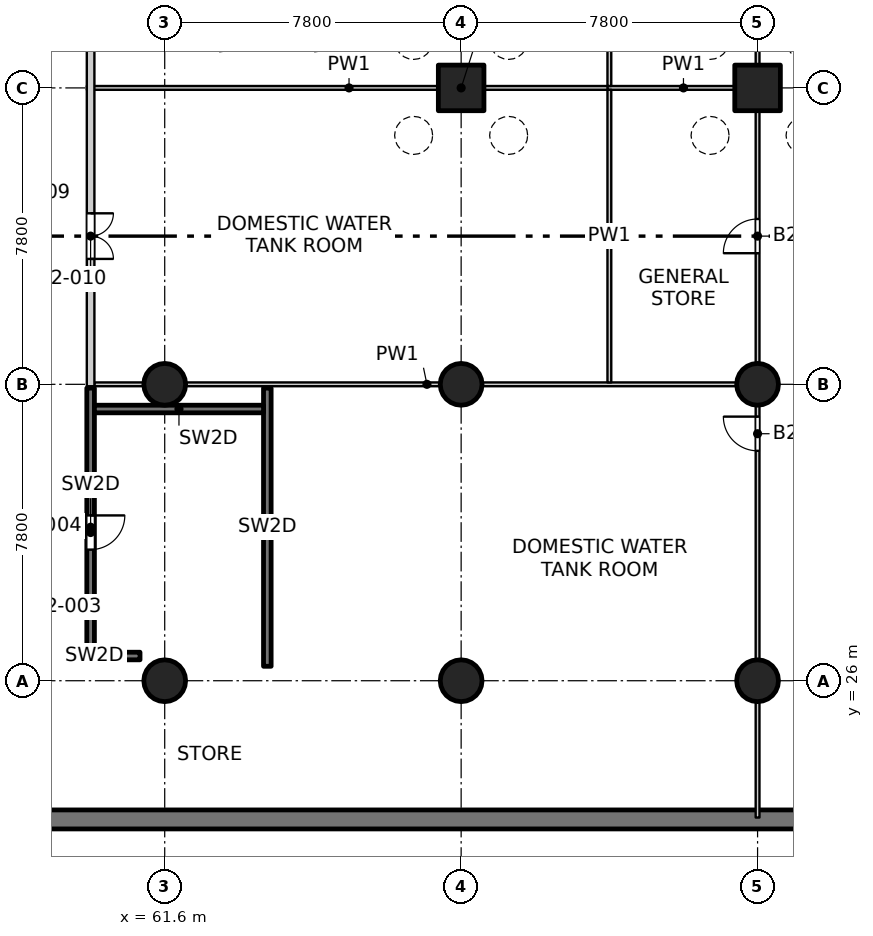
"""IFC4 building model, lengths in metres.
Left out: names, types, materials, properties, quantities, classifications, styles, units other than length and angle.
Written with IfcOpenShell. Run it as: python <this file> out.ifc"""

import sys

from ifc_helpers import new_model, si_unit, direction, frame, frame_2d, origin, origin_2d, place, context, subcontext, project, spatial, rectangle, circle, extrude, element, fill, save


model = new_model("IFC4")
c1 = context("Model", 3, precision=1e-05, world=origin(), true_north=direction((0.0, 1.0)))
c2 = subcontext(c1, "Body", "Model", "MODEL_VIEW")
j1 = project(units=[si_unit("LENGTHUNIT", "METRE"), si_unit("PLANEANGLEUNIT", "RADIAN")], contexts=[c1])
p1 = place(None, origin())
s1 = spatial("IfcSite", under=j1, at=p1, CompositionType="ELEMENT")
p2 = place(p1, origin())
s2 = spatial("IfcBuilding", under=s1, at=p2, CompositionType="ELEMENT")
p3 = place(p2, frame((0.0, 0.0, -9.0)))
s3 = spatial("IfcBuildingStorey", under=s2, at=p3, CompositionType="ELEMENT", Elevation=-9.0)
p4 = place(p3, frame((42.6, 22.35, -0.5), z_axis=(0.0, 0.0, 1.0), x_axis=(1.0, 0.0, 0.0)))
e1 = element("IfcWall", 1, at=p4, inside=s3, PredefinedType="SOLIDWALL", context=c2, shape_type="SweptSolid", body=[
    extrude(rectangle(XDim=84.8, YDim=0.5, at=frame_2d((42.4, 0.0))), origin(), (0.0, 0.0, 1.0), 4.65),
])
for number, where, z_axis, x_axis in (
    (2, (69.4, 41.6, -0.5), (0.0, 0.0, 1.0), (1.0, 0.0, 0.0)),
    (3, (77.2, 41.6, -0.5), (0.0, 0.0, 1.0), (1.0, 0.0, 0.0)),
):
    element("IfcColumn", number, at=place(p3, frame(where, z_axis=z_axis, x_axis=x_axis)), inside=s3, PredefinedType="COLUMN", context=c2, shape_type="SweptSolid", body=[
        extrude(rectangle(XDim=1.2, YDim=1.2, at=origin_2d()), origin(), (0.0, 0.0, 1.0), 4.65),
    ])
for number, where, z_axis, x_axis in (
    (4, (61.6, 26.0, -0.5), (0.0, 0.0, 1.0), (1.0, 0.0, 0.0)),
    (5, (61.6, 33.8, -0.5), (0.0, 0.0, 1.0), (1.0, 0.0, 0.0)),
    (6, (69.4, 26.0, -0.5), (0.0, 0.0, 1.0), (1.0, 0.0, 0.0)),
    (7, (69.4, 33.8, -0.5), (0.0, 0.0, 1.0), (1.0, 0.0, 0.0)),
    (8, (77.2, 26.0, -0.5), (0.0, 0.0, 1.0), (1.0, 0.0, 0.0)),
    (9, (77.2, 33.8, -0.5), (0.0, 0.0, 1.0), (1.0, 0.0, 0.0)),
):
    element("IfcColumn", number, at=place(p3, frame(where, z_axis=z_axis, x_axis=x_axis)), inside=s3, PredefinedType="COLUMN", context=c2, shape_type="SweptSolid", body=[
        extrude(circle(Radius=0.55, at=origin_2d()), origin(), (0.0, 0.0, 1.0), 4.65),
    ])
p5 = place(p3, frame((59.65, 26.38, 0.0), z_axis=(0.0, 0.0, 1.0), x_axis=(0.0, 1.0, 0.0)))
e10 = element("IfcWall", 10, at=p5, inside=s3, PredefinedType="SOLIDWALL", context=c2, shape_type="SweptSolid", body=[
    extrude(rectangle(XDim=7.32, YDim=0.2, at=frame_2d((3.66, 0.0))), origin(), (0.0, 0.0, 1.0), 4.15),
])
p6 = place(p5, frame((3.07, 0.0, 0.0)))
e11 = element("IfcOpeningElement", 11, at=p6, cuts=e10, PredefinedType="OPENING", context=c2, shape_type="SweptSolid", body=[
    extrude(rectangle(XDim=0.9, YDim=2.1, at=frame_2d((0.45, 1.05))), frame((0.0, 0.11, 0.0), z_axis=(0.0, -1.0, 0.0), x_axis=(1.0, 0.0, 0.0)), (0.0, 0.0, 1.0), 0.22),
])
p7 = place(p3, frame((64.3, 26.38, 0.0), z_axis=(0.0, 0.0, 1.0), x_axis=(0.0, 1.0, 0.0)))
e12 = element("IfcWall", 12, at=p7, inside=s3, PredefinedType="SOLIDWALL", context=c2, shape_type="SweptSolid", body=[
    extrude(rectangle(XDim=7.32, YDim=0.2, at=frame_2d((3.66, 0.0))), origin(), (0.0, 0.0, 1.0), 4.15),
])
p8 = place(p3, frame((59.75, 33.15, 0.0), z_axis=(0.0, 0.0, 1.0), x_axis=(1.0, 0.0, 0.0)))
e13 = element("IfcWall", 13, at=p8, inside=s3, PredefinedType="SOLIDWALL", context=c2, shape_type="SweptSolid", body=[
    extrude(rectangle(XDim=4.45, YDim=0.2, at=frame_2d((2.225, 0.0))), origin(), (0.0, 0.0, 1.0), 4.15),
])
p9 = place(p3, frame((59.75, 26.65, 0.0), z_axis=(0.0, 0.0, 1.0), x_axis=(1.0, 0.0, 0.0)))
e14 = element("IfcWall", 14, at=p9, inside=s3, PredefinedType="SOLIDWALL", context=c2, shape_type="SweptSolid", body=[
    extrude(rectangle(XDim=1.2, YDim=0.2, at=frame_2d((0.6, 0.0))), origin(), (0.0, 0.0, 1.0), 4.15),
])
p10 = place(p3, frame((59.75, 33.8, 0.0), z_axis=(0.0, 0.0, 1.0), x_axis=(1.0, 0.0, 0.0)))
e15 = element("IfcWall", 15, at=p10, inside=s3, PredefinedType="PARTITIONING", context=c2, shape_type="SweptSolid", body=[
    extrude(rectangle(XDim=17.5, YDim=0.1, at=frame_2d((8.75, 0.0))), origin(), (0.0, 0.0, 1.0), 4.15),
])
p11 = place(p3, frame((59.55, 41.6, 0.0), z_axis=(0.0, 0.0, 1.0), x_axis=(1.0, 0.0, 0.0)))
e16 = element("IfcWall", 16, at=p11, inside=s3, PredefinedType="PARTITIONING", context=c2, shape_type="SweptSolid", body=[
    extrude(rectangle(XDim=13.8, YDim=0.1, at=frame_2d((6.9, 0.0))), origin(), (0.0, 0.0, 1.0), 4.15),
])
p12 = place(p3, frame((73.25, 41.6, 0.0), z_axis=(0.0, 0.0, 1.0), x_axis=(1.0, 0.0, 0.0)))
e17 = element("IfcWall", 17, at=p12, inside=s3, PredefinedType="PARTITIONING", context=c2, shape_type="SweptSolid", body=[
    extrude(rectangle(XDim=4.0, YDim=0.1, at=frame_2d((2.0, 0.0))), origin(), (0.0, 0.0, 1.0), 4.15),
])
p13 = place(p3, frame((59.65, 33.75, 0.0), z_axis=(0.0, 0.0, 1.0), x_axis=(0.0, 1.0, 0.0)))
e18 = element("IfcWall", 18, at=p13, inside=s3, PredefinedType="PARTITIONING", context=c2, shape_type="SweptSolid", body=[
    extrude(rectangle(XDim=19.45, YDim=0.2, at=frame_2d((9.725, 0.0))), origin(), (0.0, 0.0, 1.0), 4.15),
])
p14 = place(p13, frame((3.35, 0.0, 0.0)))
e19 = element("IfcOpeningElement", 19, at=p14, cuts=e18, PredefinedType="OPENING", context=c2, shape_type="SweptSolid", body=[
    extrude(rectangle(XDim=1.2, YDim=2.1, at=frame_2d((0.6, 1.05))), frame((0.0, 0.11, 0.0), z_axis=(0.0, -1.0, 0.0), x_axis=(1.0, 0.0, 0.0)), (0.0, 0.0, 1.0), 0.22),
])
p15 = place(p13, frame((11.15, 0.0, 0.0)))
e20 = element("IfcOpeningElement", 20, at=p15, cuts=e18, PredefinedType="OPENING", context=c2, shape_type="SweptSolid", body=[
    extrude(rectangle(XDim=1.2, YDim=2.1, at=frame_2d((0.6, 1.05))), frame((0.0, 0.11, 0.0), z_axis=(0.0, -1.0, 0.0), x_axis=(1.0, 0.0, 0.0)), (0.0, 0.0, 1.0), 0.22),
])
p16 = place(p13, frame((17.15, 0.0, 0.0)))
e21 = element("IfcOpeningElement", 21, at=p16, cuts=e18, PredefinedType="OPENING", context=c2, shape_type="SweptSolid", body=[
    extrude(rectangle(XDim=0.9, YDim=2.1, at=frame_2d((0.45, 1.05))), frame((0.0, 0.11, 0.0), z_axis=(0.0, -1.0, 0.0), x_axis=(1.0, 0.0, 0.0)), (0.0, 0.0, 1.0), 0.22),
])
p17 = place(p3, frame((73.3, 33.85, 0.0), z_axis=(0.0, 0.0, 1.0), x_axis=(0.0, 1.0, 0.0)))
e22 = element("IfcWall", 22, at=p17, inside=s3, PredefinedType="PARTITIONING", context=c2, shape_type="SweptSolid", body=[
    extrude(rectangle(XDim=7.7, YDim=0.1, at=frame_2d((3.85, 0.0))), origin(), (0.0, 0.0, 1.0), 4.15),
])
p18 = place(p3, frame((73.3, 41.65, 0.0), z_axis=(0.0, 0.0, 1.0), x_axis=(0.0, 1.0, 0.0)))
e23 = element("IfcWall", 23, at=p18, inside=s3, PredefinedType="PARTITIONING", context=c2, shape_type="SweptSolid", body=[
    extrude(rectangle(XDim=11.55, YDim=0.1, at=frame_2d((5.775, 0.0))), origin(), (0.0, 0.0, 1.0), 4.15),
])
p19 = place(p3, frame((77.2, 22.4, 0.0), z_axis=(0.0, 0.0, 1.0), x_axis=(0.0, 1.0, 0.0)))
e24 = element("IfcWall", 24, at=p19, inside=s3, PredefinedType="PARTITIONING", context=c2, shape_type="SweptSolid", body=[
    extrude(rectangle(XDim=19.15, YDim=0.1, at=frame_2d((9.575, 0.0))), origin(), (0.0, 0.0, 1.0), 4.15),
])
p20 = place(p19, frame((9.65, 0.0, 0.0)))
e25 = element("IfcOpeningElement", 25, at=p20, cuts=e24, PredefinedType="OPENING", context=c2, shape_type="SweptSolid", body=[
    extrude(rectangle(XDim=0.9, YDim=2.1, at=frame_2d((0.45, 1.05))), frame((0.0, 0.06, 0.0), z_axis=(0.0, -1.0, 0.0), x_axis=(1.0, 0.0, 0.0)), (0.0, 0.0, 1.0), 0.12),
])
p21 = place(p19, frame((14.85, 0.0, 0.0)))
e26 = element("IfcOpeningElement", 26, at=p21, cuts=e24, PredefinedType="OPENING", context=c2, shape_type="SweptSolid", body=[
    extrude(rectangle(XDim=0.9, YDim=2.1, at=frame_2d((0.45, 1.05))), frame((0.0, 0.06, 0.0), z_axis=(0.0, -1.0, 0.0), x_axis=(1.0, 0.0, 0.0)), (0.0, 0.0, 1.0), 0.12),
])
p22 = place(p3, frame((77.2, 41.65, 0.0), z_axis=(0.0, 0.0, 1.0), x_axis=(0.0, 1.0, 0.0)))
e27 = element("IfcWall", 27, at=p22, inside=s3, PredefinedType="PARTITIONING", context=c2, shape_type="SweptSolid", body=[
    extrude(rectangle(XDim=11.55, YDim=0.1, at=frame_2d((5.775, 0.0))), origin(), (0.0, 0.0, 1.0), 4.15),
])
p23 = place(p22, frame((5.35, 0.0, 0.0)))
e28 = element("IfcOpeningElement", 28, at=p23, cuts=e27, PredefinedType="OPENING", context=c2, shape_type="SweptSolid", body=[
    extrude(rectangle(XDim=0.9, YDim=2.1, at=frame_2d((0.45, 1.05))), frame((0.0, 0.06, 0.0), z_axis=(0.0, -1.0, 0.0), x_axis=(1.0, 0.0, 0.0)), (0.0, 0.0, 1.0), 0.12),
])
p24 = place(p6, origin())
e29 = element("IfcDoor", 29, at=p24, inside=s3, OperationType="SINGLE_SWING_LEFT", PredefinedType="DOOR", context=c2, shape_type="SweptSolid", body=[
    extrude(rectangle(XDim=0.9, YDim=2.1, at=frame_2d((0.45, 1.05))), frame((0.0, 0.025, 0.0), z_axis=(0.0, -1.0, 0.0), x_axis=(1.0, 0.0, 0.0)), (0.0, 0.0, 1.0), 0.05),
])
fill(e11, e29)
p25 = place(p20, origin())
e30 = element("IfcDoor", 30, at=p25, inside=s3, OperationType="SINGLE_SWING_RIGHT", PredefinedType="DOOR", context=c2, shape_type="SweptSolid", body=[
    extrude(rectangle(XDim=0.9, YDim=2.1, at=frame_2d((0.45, 1.05))), frame((0.0, 0.025, 0.0), z_axis=(0.0, -1.0, 0.0), x_axis=(1.0, 0.0, 0.0)), (0.0, 0.0, 1.0), 0.05),
])
fill(e25, e30)
p26 = place(p14, origin())
e31 = element("IfcDoor", 31, at=p26, inside=s3, OperationType="DOUBLE_DOOR_SINGLE_SWING", PredefinedType="DOOR", context=c2, shape_type="SweptSolid", body=[
    extrude(rectangle(XDim=1.2, YDim=2.1, at=frame_2d((0.6, 1.05))), frame((0.0, 0.025, 0.0), z_axis=(0.0, -1.0, 0.0), x_axis=(1.0, 0.0, 0.0)), (0.0, 0.0, 1.0), 0.05),
])
fill(e19, e31)
p27 = place(p21, origin())
e32 = element("IfcDoor", 32, at=p27, inside=s3, OperationType="SINGLE_SWING_LEFT", PredefinedType="DOOR", context=c2, shape_type="SweptSolid", body=[
    extrude(rectangle(XDim=0.9, YDim=2.1, at=frame_2d((0.45, 1.05))), frame((0.0, 0.025, 0.0), z_axis=(0.0, -1.0, 0.0), x_axis=(1.0, 0.0, 0.0)), (0.0, 0.0, 1.0), 0.05),
])
fill(e26, e32)
save(model, sys.argv[1])
